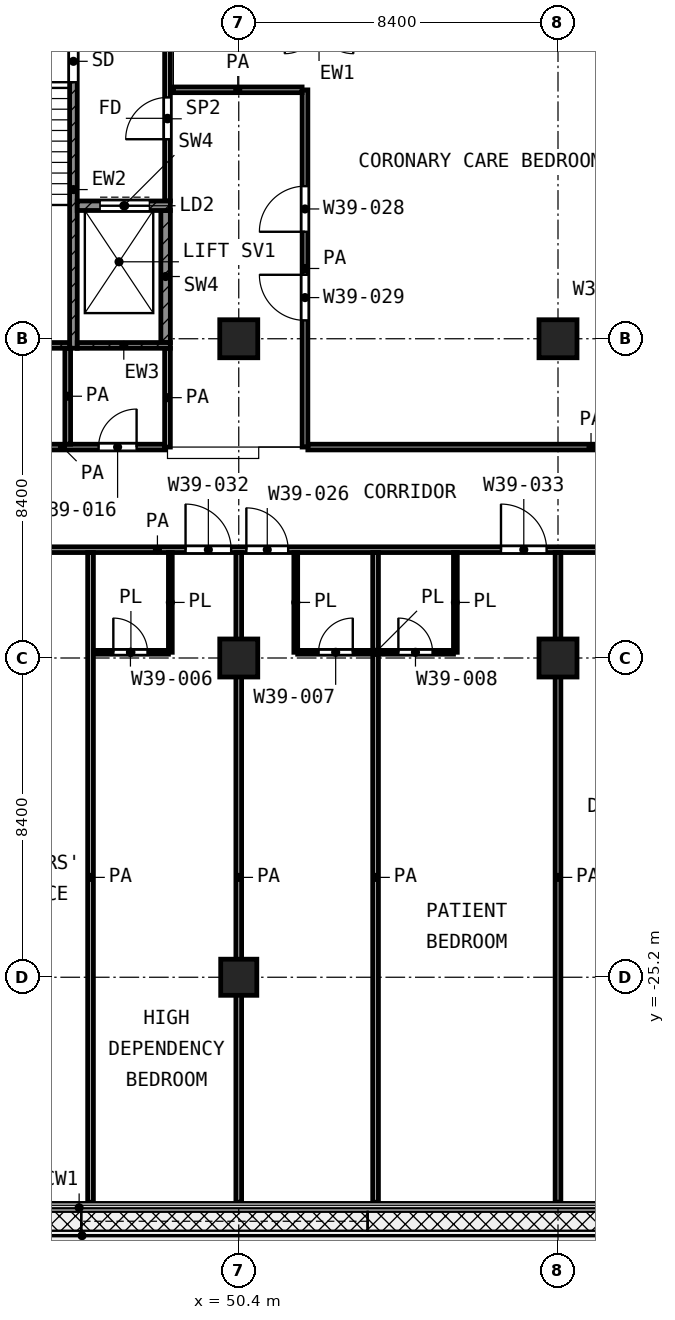
"""IFC4 building model, lengths in metres.
Left out: names, types, materials, properties, quantities, classifications, styles, units other than length and angle.
Written with IfcOpenShell. Run it as: python <this file> out.ifc"""

import sys

from ifc_helpers import new_model, si_unit, direction, frame, frame_2d, origin, origin_2d, place, context, subcontext, project, spatial, rectangle, extrude, element, fill, save


model = new_model("IFC4")
c1 = context("Model", 3, precision=1e-05, world=origin(), true_north=direction((0.0, 1.0)))
c2 = subcontext(c1, "Body", "Model", "MODEL_VIEW")
j1 = project(units=[si_unit("LENGTHUNIT", "METRE"), si_unit("PLANEANGLEUNIT", "RADIAN")], contexts=[c1])
p1 = place(None, origin())
s1 = spatial("IfcSite", under=j1, at=p1, CompositionType="ELEMENT")
p2 = place(p1, origin())
s2 = spatial("IfcBuilding", under=s1, at=p2, CompositionType="ELEMENT")
p3 = place(p2, frame((0.0, 0.0, 192.0)))
s3 = spatial("IfcBuildingStorey", under=s2, at=p3, CompositionType="ELEMENT", Elevation=192.0)
for number, where, z_axis, x_axis in (
    (1, (50.4, -8.4, 0.0), (0.0, 0.0, 1.0), (1.0, 0.0, 0.0)),
    (2, (58.8, -8.4, 0.0), (0.0, 0.0, 1.0), (1.0, 0.0, 0.0)),
    (3, (50.4, -16.8, 0.0), (0.0, 0.0, 1.0), (1.0, 0.0, 0.0)),
    (4, (58.8, -16.8, 0.0), (0.0, 0.0, 1.0), (1.0, 0.0, 0.0)),
):
    element("IfcColumn", number, at=place(p3, frame(where, z_axis=z_axis, x_axis=x_axis)), inside=s3, PredefinedType="COLUMN", context=c2, shape_type="SweptSolid", body=[
        extrude(rectangle(XDim=1.0, YDim=1.0, at=origin_2d()), origin(), (0.0, 0.0, 1.0), 4.2),
    ])
p4 = place(p3, frame((50.4, -25.2, 0.0), z_axis=(0.0, 0.0, 1.0), x_axis=(1.0, 0.0, 0.0)))
e5 = element("IfcColumn", 5, at=p4, inside=s3, PredefinedType="COLUMN", context=c2, shape_type="SweptSolid", body=[
    extrude(rectangle(XDim=0.95, YDim=0.95, at=origin_2d()), origin(), (0.0, 0.0, 1.0), 4.2),
])
p5 = place(p3, frame((46.05, -8.65, 0.0), z_axis=(0.0, 0.0, 1.0), x_axis=(0.0, 1.0, 0.0)))
e6 = element("IfcWall", 6, at=p5, inside=s3, PredefinedType="SHEAR", context=c2, shape_type="SweptSolid", body=[
    extrude(rectangle(XDim=8.35, YDim=0.2, at=frame_2d((4.175, 0.0))), origin(), (0.0, 0.0, 1.0), 3.6),
])
p6 = place(p5, frame((7.0, 0.0, 0.0)))
e7 = element("IfcOpeningElement", 7, at=p6, cuts=e6, PredefinedType="OPENING", context=c2, shape_type="SweptSolid", body=[
    extrude(rectangle(XDim=1.1, YDim=2.1, at=frame_2d((0.55, 1.05))), frame((0.0, 0.11, 0.0), z_axis=(0.0, -1.0, 0.0), x_axis=(1.0, 0.0, 0.0)), (0.0, 0.0, 1.0), 0.22),
])
p7 = place(p3, frame((43.1, -8.575, 0.0), z_axis=(0.0, 0.0, 1.0), x_axis=(1.0, 0.0, 0.0)))
e8 = element("IfcWall", 8, at=p7, inside=s3, PredefinedType="SHEAR", context=c2, shape_type="SweptSolid", body=[
    extrude(rectangle(XDim=2.85, YDim=0.15, at=frame_2d((1.425, 0.0))), origin(), (0.0, 0.0, 1.0), 3.6),
])
p8 = place(p3, frame((46.15, -8.575, 0.0), z_axis=(0.0, 0.0, 1.0), x_axis=(1.0, 0.0, 0.0)))
e9 = element("IfcWall", 9, at=p8, inside=s3, PredefinedType="SHEAR", context=c2, shape_type="SweptSolid", body=[
    extrude(rectangle(XDim=2.45, YDim=0.15, at=frame_2d((1.225, 0.0))), origin(), (0.0, 0.0, 1.0), 3.6),
])
p9 = place(p3, frame((46.15, -4.9, 0.0), z_axis=(0.0, 0.0, 1.0), x_axis=(1.0, 0.0, 0.0)))
e10 = element("IfcWall", 10, at=p9, inside=s3, PredefinedType="SHEAR", context=c2, shape_type="SweptSolid", body=[
    extrude(rectangle(XDim=2.45, YDim=0.25, at=frame_2d((1.225, 0.0))), origin(), (0.0, 0.0, 1.0), 3.6),
])
p10 = place(p9, frame((0.6, 0.0, 0.0)))
e11 = element("IfcOpeningElement", 11, at=p10, cuts=e10, PredefinedType="OPENING", context=c2, shape_type="SweptSolid", body=[
    extrude(rectangle(XDim=1.3, YDim=2.1, at=frame_2d((0.65, 1.05))), frame((0.0, 0.135, 0.0), z_axis=(0.0, -1.0, 0.0), x_axis=(1.0, 0.0, 0.0)), (0.0, 0.0, 1.0), 0.27),
])
p11 = place(p3, frame((48.475, -8.5, 0.0), z_axis=(0.0, 0.0, 1.0), x_axis=(0.0, 1.0, 0.0)))
e12 = element("IfcWall", 12, at=p11, inside=s3, PredefinedType="SHEAR", context=c2, shape_type="SweptSolid", body=[
    extrude(rectangle(XDim=3.475, YDim=0.25, at=frame_2d((1.738, 0.0))), origin(), (0.0, 0.0, 1.0), 3.6),
])
p12 = place(p3, frame((48.525, -4.775, 0.0), z_axis=(0.0, 0.0, 1.0), x_axis=(0.0, 1.0, 0.0)))
e13 = element("IfcWall", 13, at=p12, inside=s3, PredefinedType="PARTITIONING", context=c2, shape_type="SweptSolid", body=[
    extrude(rectangle(XDim=4.325, YDim=0.15, at=frame_2d((2.163, 0.0))), origin(), (0.0, 0.0, 1.0), 3.6),
])
p13 = place(p12, frame((1.625, 0.0, 0.0)))
e14 = element("IfcOpeningElement", 14, at=p13, cuts=e13, PredefinedType="OPENING", context=c2, shape_type="SweptSolid", body=[
    extrude(rectangle(XDim=1.1, YDim=2.1, at=frame_2d((0.55, 1.05))), frame((0.0, 0.085, 0.0), z_axis=(0.0, -1.0, 0.0), x_axis=(1.0, 0.0, 0.0)), (0.0, 0.0, 1.0), 0.17),
])
p14 = place(p3, frame((46.575, -16.65, 0.0), z_axis=(0.0, 0.0, 1.0), x_axis=(1.0, 0.0, 0.0)))
e15 = element("IfcWall", 15, at=p14, inside=s3, PredefinedType="PARTITIONING", context=c2, shape_type="SweptSolid", body=[
    extrude(rectangle(XDim=1.975, YDim=0.1, at=frame_2d((0.988, 0.0))), origin(), (0.0, 0.0, 1.0), 3.6),
])
p15 = place(p14, frame((0.525, 0.0, 0.0)))
e16 = element("IfcOpeningElement", 16, at=p15, cuts=e15, PredefinedType="OPENING", context=c2, shape_type="SweptSolid", body=[
    extrude(rectangle(XDim=0.9, YDim=2.1, at=frame_2d((0.45, 1.05))), frame((0.0, 0.06, 0.0), z_axis=(0.0, -1.0, 0.0), x_axis=(1.0, 0.0, 0.0)), (0.0, 0.0, 1.0), 0.12),
])
p16 = place(p3, frame((51.95, -16.65, 0.0), z_axis=(0.0, 0.0, 1.0), x_axis=(1.0, 0.0, 0.0)))
e17 = element("IfcWall", 17, at=p16, inside=s3, PredefinedType="PARTITIONING", context=c2, shape_type="SweptSolid", body=[
    extrude(rectangle(XDim=4.1, YDim=0.1, at=frame_2d((2.05, 0.0))), origin(), (0.0, 0.0, 1.0), 3.6),
])
p17 = place(p16, frame((0.55, 0.0, 0.0)))
e18 = element("IfcOpeningElement", 18, at=p17, cuts=e17, PredefinedType="OPENING", context=c2, shape_type="SweptSolid", body=[
    extrude(rectangle(XDim=0.9, YDim=2.1, at=frame_2d((0.45, 1.05))), frame((0.0, 0.06, 0.0), z_axis=(0.0, -1.0, 0.0), x_axis=(1.0, 0.0, 0.0)), (0.0, 0.0, 1.0), 0.12),
])
p18 = place(p16, frame((2.65, 0.0, 0.0)))
e19 = element("IfcOpeningElement", 19, at=p18, cuts=e17, PredefinedType="OPENING", context=c2, shape_type="SweptSolid", body=[
    extrude(rectangle(XDim=0.9, YDim=2.1, at=frame_2d((0.45, 1.05))), frame((0.0, 0.06, 0.0), z_axis=(0.0, -1.0, 0.0), x_axis=(1.0, 0.0, 0.0)), (0.0, 0.0, 1.0), 0.12),
])
for number, where, z_axis, x_axis in (
    (20, (48.6, -16.65, 0.0), (0.0, 0.0, 1.0), (0.0, 1.0, 0.0)),
    (21, (51.9, -16.65, 0.0), (0.0, 0.0, 1.0), (0.0, 1.0, 0.0)),
    (22, (56.1, -16.65, 0.0), (0.0, 0.0, 1.0), (0.0, 1.0, 0.0)),
):
    element("IfcWall", number, at=place(p3, frame(where, z_axis=z_axis, x_axis=x_axis)), inside=s3, PredefinedType="PARTITIONING", context=c2, shape_type="SweptSolid", body=[
        extrude(rectangle(XDim=2.625, YDim=0.1, at=frame_2d((1.312, 0.0))), origin(), (0.0, 0.0, 1.0), 3.6),
    ])
p19 = place(p3, frame((29.4, -13.95, 0.0), z_axis=(0.0, 0.0, 1.0), x_axis=(1.0, 0.0, 0.0)))
e23 = element("IfcWall", 23, at=p19, inside=s3, PredefinedType="PARTITIONING", context=c2, shape_type="SweptSolid", body=[
    extrude(rectangle(XDim=37.72, YDim=0.15, at=frame_2d((18.86, 0.0))), origin(), (0.0, 0.0, 1.0), 3.6),
])
p20 = place(p19, frame((1.6, 0.0, 0.0)))
e24 = element("IfcOpeningElement", 24, at=p20, cuts=e23, PredefinedType="OPENING", context=c2, shape_type="SweptSolid", body=[
    extrude(rectangle(XDim=1.0, YDim=2.1, at=frame_2d((0.5, 1.05))), frame((0.0, 0.085, 0.0), z_axis=(0.0, -1.0, 0.0), x_axis=(1.0, 0.0, 0.0)), (0.0, 0.0, 1.0), 0.17),
])
p21 = place(p19, frame((5.55, 0.0, 0.0)))
e25 = element("IfcOpeningElement", 25, at=p21, cuts=e23, PredefinedType="OPENING", context=c2, shape_type="SweptSolid", body=[
    extrude(rectangle(XDim=1.2, YDim=2.1, at=frame_2d((0.6, 1.05))), frame((0.0, 0.085, 0.0), z_axis=(0.0, -1.0, 0.0), x_axis=(1.0, 0.0, 0.0)), (0.0, 0.0, 1.0), 0.17),
])
p22 = place(p19, frame((11.2, 0.0, 0.0)))
e26 = element("IfcOpeningElement", 26, at=p22, cuts=e23, PredefinedType="OPENING", context=c2, shape_type="SweptSolid", body=[
    extrude(rectangle(XDim=1.2, YDim=2.1, at=frame_2d((0.6, 1.05))), frame((0.0, 0.085, 0.0), z_axis=(0.0, -1.0, 0.0), x_axis=(1.0, 0.0, 0.0)), (0.0, 0.0, 1.0), 0.17),
])
p23 = place(p19, frame((14.35, 0.0, 0.0)))
e27 = element("IfcOpeningElement", 27, at=p23, cuts=e23, PredefinedType="OPENING", context=c2, shape_type="SweptSolid", body=[
    extrude(rectangle(XDim=1.0, YDim=2.1, at=frame_2d((0.5, 1.05))), frame((0.0, 0.085, 0.0), z_axis=(0.0, -1.0, 0.0), x_axis=(1.0, 0.0, 0.0)), (0.0, 0.0, 1.0), 0.17),
])
p24 = place(p19, frame((19.6, 0.0, 0.0)))
e28 = element("IfcOpeningElement", 28, at=p24, cuts=e23, PredefinedType="OPENING", context=c2, shape_type="SweptSolid", body=[
    extrude(rectangle(XDim=1.2, YDim=2.1, at=frame_2d((0.6, 1.05))), frame((0.0, 0.085, 0.0), z_axis=(0.0, -1.0, 0.0), x_axis=(1.0, 0.0, 0.0)), (0.0, 0.0, 1.0), 0.17),
])
p25 = place(p19, frame((21.2, 0.0, 0.0)))
e29 = element("IfcOpeningElement", 29, at=p25, cuts=e23, PredefinedType="OPENING", context=c2, shape_type="SweptSolid", body=[
    extrude(rectangle(XDim=1.1, YDim=2.1, at=frame_2d((0.55, 1.05))), frame((0.0, 0.085, 0.0), z_axis=(0.0, -1.0, 0.0), x_axis=(1.0, 0.0, 0.0)), (0.0, 0.0, 1.0), 0.17),
])
p26 = place(p19, frame((27.9, 0.0, 0.0)))
e30 = element("IfcOpeningElement", 30, at=p26, cuts=e23, PredefinedType="OPENING", context=c2, shape_type="SweptSolid", body=[
    extrude(rectangle(XDim=1.2, YDim=2.1, at=frame_2d((0.6, 1.05))), frame((0.0, 0.085, 0.0), z_axis=(0.0, -1.0, 0.0), x_axis=(1.0, 0.0, 0.0)), (0.0, 0.0, 1.0), 0.17),
])
p27 = place(p19, frame((31.0, 0.0, 0.0)))
e31 = element("IfcOpeningElement", 31, at=p27, cuts=e23, PredefinedType="OPENING", context=c2, shape_type="SweptSolid", body=[
    extrude(rectangle(XDim=1.0, YDim=2.1, at=frame_2d((0.5, 1.05))), frame((0.0, 0.085, 0.0), z_axis=(0.0, -1.0, 0.0), x_axis=(1.0, 0.0, 0.0)), (0.0, 0.0, 1.0), 0.17),
])
p28 = place(p19, frame((35.2, 0.0, 0.0)))
e32 = element("IfcOpeningElement", 32, at=p28, cuts=e23, PredefinedType="OPENING", context=c2, shape_type="SweptSolid", body=[
    extrude(rectangle(XDim=1.0, YDim=2.1, at=frame_2d((0.5, 1.05))), frame((0.0, 0.085, 0.0), z_axis=(0.0, -1.0, 0.0), x_axis=(1.0, 0.0, 0.0)), (0.0, 0.0, 1.0), 0.17),
])
p29 = place(p3, frame((43.075, -11.25, 0.0), z_axis=(0.0, 0.0, 1.0), x_axis=(1.0, 0.0, 0.0)))
e33 = element("IfcWall", 33, at=p29, inside=s3, PredefinedType="PARTITIONING", context=c2, shape_type="SweptSolid", body=[
    extrude(rectangle(XDim=5.375, YDim=0.15, at=frame_2d((2.688, 0.0))), origin(), (0.0, 0.0, 1.0), 3.6),
])
p30 = place(p29, frame((0.875, 0.0, 0.0)))
e34 = element("IfcOpeningElement", 34, at=p30, cuts=e33, PredefinedType="OPENING", context=c2, shape_type="SweptSolid", body=[
    extrude(rectangle(XDim=1.0, YDim=2.1, at=frame_2d((0.5, 1.05))), frame((0.0, 0.085, 0.0), z_axis=(0.0, -1.0, 0.0), x_axis=(1.0, 0.0, 0.0)), (0.0, 0.0, 1.0), 0.17),
])
p31 = place(p29, frame((3.637, 0.0, 0.0)))
e35 = element("IfcOpeningElement", 35, at=p31, cuts=e33, PredefinedType="OPENING", context=c2, shape_type="SweptSolid", body=[
    extrude(rectangle(XDim=1.0, YDim=2.1, at=frame_2d((0.5, 1.05))), frame((0.0, 0.085, 0.0), z_axis=(0.0, -1.0, 0.0), x_axis=(1.0, 0.0, 0.0)), (0.0, 0.0, 1.0), 0.17),
])
p32 = place(p3, frame((52.218, -11.25, 0.0), z_axis=(0.0, 0.0, 1.0), x_axis=(1.0, 0.0, 0.0)))
e36 = element("IfcWall", 36, at=p32, inside=s3, PredefinedType="PARTITIONING", context=c2, shape_type="SweptSolid", body=[
    extrude(rectangle(XDim=14.902, YDim=0.15, at=frame_2d((7.451, 0.0))), origin(), (0.0, 0.0, 1.0), 3.6),
])
p33 = place(p32, frame((12.082, 0.0, 0.0)))
e37 = element("IfcOpeningElement", 37, at=p33, cuts=e36, PredefinedType="OPENING", context=c2, shape_type="SweptSolid", body=[
    extrude(rectangle(XDim=1.0, YDim=2.1, at=frame_2d((0.5, 1.05))), frame((0.0, 0.085, 0.0), z_axis=(0.0, -1.0, 0.0), x_axis=(1.0, 0.0, 0.0)), (0.0, 0.0, 1.0), 0.17),
])
p34 = place(p3, frame((48.68, -1.85, 0.0), z_axis=(0.0, 0.0, 1.0), x_axis=(1.0, 0.0, 0.0)))
e38 = element("IfcWall", 38, at=p34, inside=s3, PredefinedType="PARTITIONING", context=c2, shape_type="SweptSolid", body=[
    extrude(rectangle(XDim=3.387, YDim=0.15, at=frame_2d((1.693, 0.0))), origin(), (0.0, 0.0, 1.0), 3.6),
])
p35 = place(p3, frame((45.9, -11.175, 0.0), z_axis=(0.0, 0.0, 1.0), x_axis=(0.0, 1.0, 0.0)))
e39 = element("IfcWall", 39, at=p35, inside=s3, PredefinedType="PARTITIONING", context=c2, shape_type="SweptSolid", body=[
    extrude(rectangle(XDim=2.525, YDim=0.15, at=frame_2d((1.263, 0.0))), origin(), (0.0, 0.0, 1.0), 3.6),
])
p36 = place(p3, frame((46.5, -31.12, 0.0), z_axis=(0.0, 0.0, 1.0), x_axis=(0.0, 1.0, 0.0)))
e40 = element("IfcWall", 40, at=p36, inside=s3, PredefinedType="PARTITIONING", context=c2, shape_type="SweptSolid", body=[
    extrude(rectangle(XDim=17.095, YDim=0.15, at=frame_2d((8.548, 0.0))), origin(), (0.0, 0.0, 1.0), 3.6),
])
p37 = place(p3, frame((48.525, -11.25, 0.0), z_axis=(0.0, 0.0, 1.0), x_axis=(0.0, 1.0, 0.0)))
e41 = element("IfcWall", 41, at=p37, inside=s3, PredefinedType="PARTITIONING", context=c2, shape_type="SweptSolid", body=[
    extrude(rectangle(XDim=2.6, YDim=0.15, at=frame_2d((1.3, 0.0))), origin(), (0.0, 0.0, 1.0), 3.6),
])
p38 = place(p3, frame((50.4, -31.12, 0.0), z_axis=(0.0, 0.0, 1.0), x_axis=(0.0, 1.0, 0.0)))
e42 = element("IfcWall", 42, at=p38, inside=s3, PredefinedType="PARTITIONING", context=c2, shape_type="SweptSolid", body=[
    extrude(rectangle(XDim=17.095, YDim=0.15, at=frame_2d((8.548, 0.0))), origin(), (0.0, 0.0, 1.0), 3.6),
])
p39 = place(p3, frame((52.143, -11.25, 0.0), z_axis=(0.0, 0.0, 1.0), x_axis=(0.0, 1.0, 0.0)))
e43 = element("IfcWall", 43, at=p39, inside=s3, PredefinedType="PARTITIONING", context=c2, shape_type="SweptSolid", body=[
    extrude(rectangle(XDim=9.398, YDim=0.15, at=frame_2d((4.699, 0.0))), origin(), (0.0, 0.0, 1.0), 3.6),
])
p40 = place(p39, frame((5.665, 0.0, 0.0)))
e44 = element("IfcOpeningElement", 44, at=p40, cuts=e43, PredefinedType="OPENING", context=c2, shape_type="SweptSolid", body=[
    extrude(rectangle(XDim=1.2, YDim=2.1, at=frame_2d((0.6, 1.05))), frame((0.0, 0.085, 0.0), z_axis=(0.0, -1.0, 0.0), x_axis=(1.0, 0.0, 0.0)), (0.0, 0.0, 1.0), 0.17),
])
p41 = place(p39, frame((3.333, 0.0, 0.0)))
e45 = element("IfcOpeningElement", 45, at=p41, cuts=e43, PredefinedType="OPENING", context=c2, shape_type="SweptSolid", body=[
    extrude(rectangle(XDim=1.2, YDim=2.1, at=frame_2d((0.6, 1.05))), frame((0.0, 0.085, 0.0), z_axis=(0.0, -1.0, 0.0), x_axis=(1.0, 0.0, 0.0)), (0.0, 0.0, 1.0), 0.17),
])
for number, where, z_axis, x_axis in (
    (46, (54.0, -31.12, 0.0), (0.0, 0.0, 1.0), (0.0, 1.0, 0.0)),
    (47, (58.8, -31.12, 0.0), (0.0, 0.0, 1.0), (0.0, 1.0, 0.0)),
):
    element("IfcWall", number, at=place(p3, frame(where, z_axis=z_axis, x_axis=x_axis)), inside=s3, PredefinedType="PARTITIONING", context=c2, shape_type="SweptSolid", body=[
        extrude(rectangle(XDim=17.095, YDim=0.15, at=frame_2d((8.548, 0.0))), origin(), (0.0, 0.0, 1.0), 3.6),
    ])
p42 = place(p6, origin())
e48 = element("IfcDoor", 48, at=p42, inside=s3, OperationType="SINGLE_SWING_LEFT", PredefinedType="DOOR", context=c2, shape_type="SweptSolid", body=[
    extrude(rectangle(XDim=1.1, YDim=2.1, at=frame_2d((0.55, 1.05))), frame((0.0, 0.025, 0.0), z_axis=(0.0, -1.0, 0.0), x_axis=(1.0, 0.0, 0.0)), (0.0, 0.0, 1.0), 0.05),
])
fill(e7, e48)
p43 = place(p10, origin())
e49 = element("IfcDoor", 49, at=p43, inside=s3, OperationType="DOUBLE_DOOR_SLIDING", PredefinedType="DOOR", context=c2, shape_type="SweptSolid", body=[
    extrude(rectangle(XDim=1.3, YDim=2.1, at=frame_2d((0.65, 1.05))), frame((0.0, 0.025, 0.0), z_axis=(0.0, -1.0, 0.0), x_axis=(1.0, 0.0, 0.0)), (0.0, 0.0, 1.0), 0.05),
])
fill(e11, e49)
p44 = place(p13, origin())
e50 = element("IfcDoor", 50, at=p44, inside=s3, OperationType="SINGLE_SWING_LEFT", PredefinedType="DOOR", context=c2, shape_type="SweptSolid", body=[
    extrude(rectangle(XDim=1.1, YDim=2.1, at=frame_2d((0.55, 1.05))), frame((0.0, 0.025, 0.0), z_axis=(0.0, -1.0, 0.0), x_axis=(1.0, 0.0, 0.0)), (0.0, 0.0, 1.0), 0.05),
])
fill(e14, e50)
p45 = place(p31, origin())
e51 = element("IfcDoor", 51, at=p45, inside=s3, OperationType="SINGLE_SWING_RIGHT", PredefinedType="DOOR", context=c2, shape_type="SweptSolid", body=[
    extrude(rectangle(XDim=1.0, YDim=2.1, at=frame_2d((0.5, 1.05))), frame((0.0, 0.025, 0.0), z_axis=(0.0, -1.0, 0.0), x_axis=(1.0, 0.0, 0.0)), (0.0, 0.0, 1.0), 0.05),
])
fill(e35, e51)
p46 = place(p40, origin())
e52 = element("IfcDoor", 52, at=p46, inside=s3, OperationType="SINGLE_SWING_LEFT", PredefinedType="DOOR", context=c2, shape_type="SweptSolid", body=[
    extrude(rectangle(XDim=1.2, YDim=2.1, at=frame_2d((0.6, 1.05))), frame((0.0, 0.025, 0.0), z_axis=(0.0, -1.0, 0.0), x_axis=(1.0, 0.0, 0.0)), (0.0, 0.0, 1.0), 0.05),
])
fill(e44, e52)
p47 = place(p41, origin())
e53 = element("IfcDoor", 53, at=p47, inside=s3, OperationType="SINGLE_SWING_RIGHT", PredefinedType="DOOR", context=c2, shape_type="SweptSolid", body=[
    extrude(rectangle(XDim=1.2, YDim=2.1, at=frame_2d((0.6, 1.05))), frame((0.0, 0.025, 0.0), z_axis=(0.0, -1.0, 0.0), x_axis=(1.0, 0.0, 0.0)), (0.0, 0.0, 1.0), 0.05),
])
fill(e45, e53)
p48 = place(p24, origin())
e54 = element("IfcDoor", 54, at=p48, inside=s3, OperationType="SINGLE_SWING_LEFT", PredefinedType="DOOR", context=c2, shape_type="SweptSolid", body=[
    extrude(rectangle(XDim=1.2, YDim=2.1, at=frame_2d((0.6, 1.05))), frame((0.0, 0.025, 0.0), z_axis=(0.0, -1.0, 0.0), x_axis=(1.0, 0.0, 0.0)), (0.0, 0.0, 1.0), 0.05),
])
fill(e28, e54)
p49 = place(p15, origin())
e55 = element("IfcDoor", 55, at=p49, inside=s3, OperationType="SINGLE_SWING_LEFT", PredefinedType="DOOR", context=c2, shape_type="SweptSolid", body=[
    extrude(rectangle(XDim=0.9, YDim=2.1, at=frame_2d((0.45, 1.05))), frame((0.0, 0.025, 0.0), z_axis=(0.0, -1.0, 0.0), x_axis=(1.0, 0.0, 0.0)), (0.0, 0.0, 1.0), 0.05),
])
fill(e16, e55)
p50 = place(p25, origin())
e56 = element("IfcDoor", 56, at=p50, inside=s3, OperationType="SINGLE_SWING_LEFT", PredefinedType="DOOR", context=c2, shape_type="SweptSolid", body=[
    extrude(rectangle(XDim=1.1, YDim=2.1, at=frame_2d((0.55, 1.05))), frame((0.0, 0.025, 0.0), z_axis=(0.0, -1.0, 0.0), x_axis=(1.0, 0.0, 0.0)), (0.0, 0.0, 1.0), 0.05),
])
fill(e29, e56)
p51 = place(p17, origin())
e57 = element("IfcDoor", 57, at=p51, inside=s3, OperationType="SINGLE_SWING_RIGHT", PredefinedType="DOOR", context=c2, shape_type="SweptSolid", body=[
    extrude(rectangle(XDim=0.9, YDim=2.1, at=frame_2d((0.45, 1.05))), frame((0.0, 0.025, 0.0), z_axis=(0.0, -1.0, 0.0), x_axis=(1.0, 0.0, 0.0)), (0.0, 0.0, 1.0), 0.05),
])
fill(e18, e57)
p52 = place(p26, origin())
e58 = element("IfcDoor", 58, at=p52, inside=s3, OperationType="SINGLE_SWING_LEFT", PredefinedType="DOOR", context=c2, shape_type="SweptSolid", body=[
    extrude(rectangle(XDim=1.2, YDim=2.1, at=frame_2d((0.6, 1.05))), frame((0.0, 0.025, 0.0), z_axis=(0.0, -1.0, 0.0), x_axis=(1.0, 0.0, 0.0)), (0.0, 0.0, 1.0), 0.05),
])
fill(e30, e58)
p53 = place(p18, origin())
e59 = element("IfcDoor", 59, at=p53, inside=s3, OperationType="SINGLE_SWING_LEFT", PredefinedType="DOOR", context=c2, shape_type="SweptSolid", body=[
    extrude(rectangle(XDim=0.9, YDim=2.1, at=frame_2d((0.45, 1.05))), frame((0.0, 0.025, 0.0), z_axis=(0.0, -1.0, 0.0), x_axis=(1.0, 0.0, 0.0)), (0.0, 0.0, 1.0), 0.05),
])
fill(e19, e59)
save(model, sys.argv[1])
